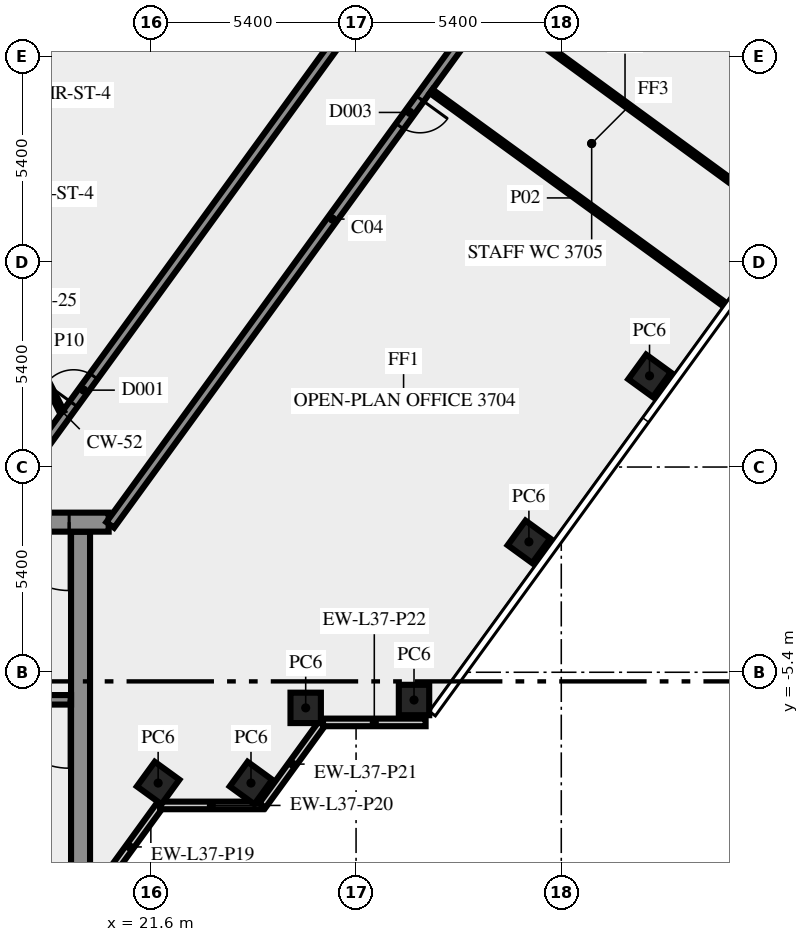
"""IFC4 building model, lengths in metres.
Left out: names, types, materials, properties, quantities, classifications, styles, units other than length and angle.
Written with IfcOpenShell. Run it as: python <this file> out.ifc"""

import sys

from ifc_helpers import new_model, si_unit, direction, frame, frame_2d, origin, origin_2d, place, context, subcontext, project, spatial, rectangle, extrude, element, fill, save


model = new_model("IFC4")
c1 = context("Model", 3, precision=1e-05, world=origin(), true_north=direction((0.0, 1.0)))
c2 = subcontext(c1, "Body", "Model", "MODEL_VIEW")
j1 = project(units=[si_unit("LENGTHUNIT", "METRE"), si_unit("PLANEANGLEUNIT", "RADIAN")], contexts=[c1])
p1 = place(None, origin())
s1 = spatial("IfcSite", under=j1, at=p1, CompositionType="ELEMENT")
p2 = place(p1, origin())
s2 = spatial("IfcBuilding", under=s1, at=p2, CompositionType="ELEMENT")
p3 = place(p2, frame((0.0, 0.0, 160.0)))
s3 = spatial("IfcBuildingStorey", under=s2, at=p3, CompositionType="ELEMENT", Elevation=160.0)
for number, where, z_axis, x_axis in (
    (1, (21.792, -8.315, 0.0), (0.0, 0.0, 1.0), (0.588, 0.809, 0.0)),
    (2, (24.235, -8.315, 0.0), (0.0, 0.0, 1.0), (0.588, 0.809, 0.0)),
    (3, (25.674, -6.337, 0.0), (0.0, 0.0, 1.0), (1.0, 0.0, 0.0)),
    (4, (28.525, -6.13, 0.0), (0.0, 0.0, 1.0), (1.0, 0.0, 0.0)),
    (5, (31.548, -1.969, 0.0), (0.0, 0.0, 1.0), (0.588, 0.809, 0.0)),
    (6, (34.722, 2.4, 0.0), (0.0, 0.0, 1.0), (0.588, 0.809, 0.0)),
):
    element("IfcColumn", number, at=place(p3, frame(where, z_axis=z_axis, x_axis=x_axis)), inside=s3, PredefinedType="COLUMN", context=c2, shape_type="SweptSolid", body=[
        extrude(rectangle(XDim=0.8, YDim=0.8, at=origin_2d()), origin(), (0.0, 0.0, 1.0), 3.65),
    ])
p4 = place(p3, frame((20.253, -11.083, 0.0), z_axis=(0.0, 0.0, 1.0), x_axis=(0.587766567315, 0.809030569476, 0.0)))
e7 = element("IfcWall", 7, at=p4, inside=s3, PredefinedType="SOLIDWALL", context=c2, shape_type="SweptSolid", body=[
    extrude(rectangle(XDim=2.688, YDim=0.2, at=frame_2d((1.344, 0.0))), origin(), (0.0, 0.0, 1.0), 3.65),
])
p5 = place(p3, frame((21.843, -8.904, 0.0), z_axis=(0.0, 0.0, 1.0), x_axis=(1.0, 0.0, 0.0)))
e8 = element("IfcWall", 8, at=p5, inside=s3, PredefinedType="SOLIDWALL", context=c2, shape_type="SweptSolid", body=[
    extrude(rectangle(XDim=2.7, YDim=0.2, at=frame_2d((1.35, 0.0))), origin(), (0.0, 0.0, 1.0), 3.65),
])
p6 = place(p3, frame((24.533, -8.909, 0.0), z_axis=(0.0, 0.0, 1.0), x_axis=(0.587720002413, 0.809064397168, 0.0)))
e9 = element("IfcWall", 9, at=p6, inside=s3, PredefinedType="SOLIDWALL", context=c2, shape_type="SweptSolid", body=[
    extrude(rectangle(XDim=2.7, YDim=0.2, at=frame_2d((1.35, 0.0))), origin(), (0.0, 0.0, 1.0), 3.65),
])
p7 = place(p3, frame((26.13, -6.719, 0.0), z_axis=(0.0, 0.0, 1.0), x_axis=(1.0, 0.0, 0.0)))
e10 = element("IfcWall", 10, at=p7, inside=s3, PredefinedType="SOLIDWALL", context=c2, shape_type="SweptSolid", body=[
    extrude(rectangle(XDim=2.7, YDim=0.2, at=frame_2d((1.35, 0.0))), origin(), (0.0, 0.0, 1.0), 3.65),
])
p8 = place(p3, frame((19.75, -10.5, 0.0), z_axis=(0.0, 0.0, 1.0), x_axis=(0.0, 1.0, 0.0)))
e11 = element("IfcWall", 11, at=p8, inside=s3, PredefinedType="SHEAR", context=c2, shape_type="SweptSolid", body=[
    extrude(rectangle(XDim=8.8, YDim=0.5, at=frame_2d((4.4, 0.0))), origin(), (0.0, 0.0, 1.0), 3.65),
])
p9 = place(p3, frame((19.5, -6.125, 0.0), z_axis=(0.0, 0.0, 1.0), x_axis=(-1.0, 0.0, 0.0)))
e12 = element("IfcWall", 12, at=p9, inside=s3, PredefinedType="SHEAR", context=c2, shape_type="SweptSolid", body=[
    extrude(rectangle(XDim=8.05, YDim=0.25, at=frame_2d((4.025, 0.0))), origin(), (0.0, 0.0, 1.0), 3.65),
])
p10 = place(p9, frame((0.05, 0.0, 0.0)))
e13 = element("IfcOpeningElement", 13, at=p10, cuts=e12, PredefinedType="OPENING", context=c2, shape_type="SweptSolid", body=[
    extrude(rectangle(XDim=1.8, YDim=2.1, at=frame_2d((0.9, 1.05))), frame((0.0, 0.135, 0.0), z_axis=(0.0, -1.0, 0.0), x_axis=(1.0, 0.0, 0.0)), (0.0, 0.0, 1.0), 0.27),
])
p11 = place(p3, frame((20.49, -1.45, 0.0), z_axis=(0.0, 0.0, 1.0), x_axis=(-1.0, 0.0, 0.0)))
e14 = element("IfcWall", 14, at=p11, inside=s3, PredefinedType="SHEAR", context=c2, shape_type="SweptSolid", body=[
    extrude(rectangle(XDim=40.98, YDim=0.5, at=frame_2d((20.49, 0.0))), origin(), (0.0, 0.0, 1.0), 3.65),
])
p12 = place(p11, frame((38.14, 0.0, 0.0)))
e15 = element("IfcOpeningElement", 15, at=p12, cuts=e14, PredefinedType="OPENING", context=c2, shape_type="SweptSolid", body=[
    extrude(rectangle(XDim=1.8, YDim=2.1, at=frame_2d((0.9, 1.05))), frame((0.0, 0.26, 0.0), z_axis=(0.0, -1.0, 0.0), x_axis=(1.0, 0.0, 0.0)), (0.0, 0.0, 1.0), 0.52),
])
p13 = place(p11, frame((35.89, 0.0, 0.0)))
e16 = element("IfcOpeningElement", 16, at=p13, cuts=e14, PredefinedType="OPENING", context=c2, shape_type="SweptSolid", body=[
    extrude(rectangle(XDim=0.9, YDim=2.1, at=frame_2d((0.45, 1.05))), frame((0.0, 0.26, 0.0), z_axis=(0.0, -1.0, 0.0), x_axis=(1.0, 0.0, 0.0)), (0.0, 0.0, 1.0), 0.52),
])
p14 = place(p11, frame((32.94, 0.0, 0.0)))
e17 = element("IfcOpeningElement", 17, at=p14, cuts=e14, PredefinedType="OPENING", context=c2, shape_type="SweptSolid", body=[
    extrude(rectangle(XDim=0.9, YDim=2.1, at=frame_2d((0.45, 1.05))), frame((0.0, 0.26, 0.0), z_axis=(0.0, -1.0, 0.0), x_axis=(1.0, 0.0, 0.0)), (0.0, 0.0, 1.0), 0.52),
])
p15 = place(p11, frame((28.802, 0.0, 0.0)))
e18 = element("IfcOpeningElement", 18, at=p15, cuts=e14, PredefinedType="OPENING", context=c2, shape_type="SweptSolid", body=[
    extrude(rectangle(XDim=0.9, YDim=2.1, at=frame_2d((0.45, 1.05))), frame((0.0, 0.26, 0.0), z_axis=(0.0, -1.0, 0.0), x_axis=(1.0, 0.0, 0.0)), (0.0, 0.0, 1.0), 0.52),
])
p16 = place(p11, frame((25.077, 0.0, 0.0)))
e19 = element("IfcOpeningElement", 19, at=p16, cuts=e14, PredefinedType="OPENING", context=c2, shape_type="SweptSolid", body=[
    extrude(rectangle(XDim=0.9, YDim=2.1, at=frame_2d((0.45, 1.05))), frame((0.0, 0.26, 0.0), z_axis=(0.0, -1.0, 0.0), x_axis=(1.0, 0.0, 0.0)), (0.0, 0.0, 1.0), 0.52),
])
p17 = place(p11, frame((21.765, 0.0, 0.0)))
e20 = element("IfcOpeningElement", 20, at=p17, cuts=e14, PredefinedType="OPENING", context=c2, shape_type="SweptSolid", body=[
    extrude(rectangle(XDim=2.0, YDim=2.1, at=frame_2d((1.0, 1.05))), frame((0.0, 0.26, 0.0), z_axis=(0.0, -1.0, 0.0), x_axis=(1.0, 0.0, 0.0)), (0.0, 0.0, 1.0), 0.52),
])
p18 = place(p11, frame((7.14, 0.0, 0.0)))
e21 = element("IfcOpeningElement", 21, at=p18, cuts=e14, PredefinedType="OPENING", context=c2, shape_type="SweptSolid", body=[
    extrude(rectangle(XDim=0.9, YDim=2.1, at=frame_2d((0.45, 1.05))), frame((0.0, 0.26, 0.0), z_axis=(0.0, -1.0, 0.0), x_axis=(1.0, 0.0, 0.0)), (0.0, 0.0, 1.0), 0.52),
])
p19 = place(p11, frame((5.028, 0.0, 0.0)))
e22 = element("IfcOpeningElement", 22, at=p19, cuts=e14, PredefinedType="OPENING", context=c2, shape_type="SweptSolid", body=[
    extrude(rectangle(XDim=0.8, YDim=2.1, at=frame_2d((0.4, 1.05))), frame((0.0, 0.26, 0.0), z_axis=(0.0, -1.0, 0.0), x_axis=(1.0, 0.0, 0.0)), (0.0, 0.0, 1.0), 0.52),
])
p20 = place(p11, frame((3.452, 0.0, 0.0)))
e23 = element("IfcOpeningElement", 23, at=p20, cuts=e14, PredefinedType="OPENING", context=c2, shape_type="SweptSolid", body=[
    extrude(rectangle(XDim=0.8, YDim=2.1, at=frame_2d((0.4, 1.05))), frame((0.0, 0.26, 0.0), z_axis=(0.0, -1.0, 0.0), x_axis=(1.0, 0.0, 0.0)), (0.0, 0.0, 1.0), 0.52),
])
p21 = place(p11, frame((1.04, 0.0, 0.0)))
e24 = element("IfcOpeningElement", 24, at=p21, cuts=e14, PredefinedType="OPENING", context=c2, shape_type="SweptSolid", body=[
    extrude(rectangle(XDim=1.8, YDim=2.1, at=frame_2d((0.9, 1.05))), frame((0.0, 0.26, 0.0), z_axis=(0.0, -1.0, 0.0), x_axis=(1.0, 0.0, 0.0)), (0.0, 0.0, 1.0), 0.52),
])
p22 = place(p3, frame((17.545, -1.125, 0.0), z_axis=(0.0, 0.0, 1.0), x_axis=(0.587786330937, 0.809016210693, 0.0)))
e25 = element("IfcWall", 25, at=p22, inside=s3, PredefinedType="SOLIDWALL", context=c2, shape_type="SweptSolid", body=[
    extrude(rectangle(XDim=30.103, YDim=0.25, at=frame_2d((15.052, 0.0))), origin(), (0.0, 0.0, 1.0), 3.65),
])
p23 = place(p22, frame((3.441, 0.0, 0.0)))
e26 = element("IfcOpeningElement", 26, at=p23, cuts=e25, PredefinedType="OPENING", context=c2, shape_type="SweptSolid", body=[
    extrude(rectangle(XDim=0.9, YDim=2.1, at=frame_2d((0.45, 1.05))), frame((0.0, 0.135, 0.0), z_axis=(0.0, -1.0, 0.0), x_axis=(1.0, 0.0, 0.0)), (0.0, 0.0, 1.0), 0.27),
])
p24 = place(p22, frame((28.729, 0.0, 0.0)))
e27 = element("IfcOpeningElement", 27, at=p24, cuts=e25, PredefinedType="OPENING", context=c2, shape_type="SweptSolid", body=[
    extrude(rectangle(XDim=0.9, YDim=2.1, at=frame_2d((0.45, 1.05))), frame((0.0, 0.135, 0.0), z_axis=(0.0, -1.0, 0.0), x_axis=(1.0, 0.0, 0.0)), (0.0, 0.0, 1.0), 0.27),
])
p25 = place(p3, frame((37.236, 21.469, 0.0), z_axis=(0.0, 0.0, 1.0), x_axis=(-0.58778344073, -0.809018310549, 0.0)))
e28 = element("IfcWall", 28, at=p25, inside=s3, PredefinedType="SOLIDWALL", context=c2, shape_type="SweptSolid", body=[
    extrude(rectangle(XDim=28.42, YDim=0.25, at=frame_2d((14.21, 0.0))), origin(), (0.0, 0.0, 1.0), 3.65),
])
p26 = place(p25, frame((14.554, 0.0, 0.0)))
e29 = element("IfcOpeningElement", 29, at=p26, cuts=e28, PredefinedType="OPENING", context=c2, shape_type="SweptSolid", body=[
    extrude(rectangle(XDim=0.9, YDim=2.1, at=frame_2d((0.45, 1.05))), frame((0.0, 0.135, 0.0), z_axis=(0.0, -1.0, 0.0), x_axis=(1.0, 0.0, 0.0)), (0.0, 0.0, 1.0), 0.27),
])
p27 = place(p25, frame((10.255, 0.0, 0.0)))
e30 = element("IfcOpeningElement", 30, at=p27, cuts=e28, PredefinedType="OPENING", context=c2, shape_type="SweptSolid", body=[
    extrude(rectangle(XDim=0.9, YDim=2.1, at=frame_2d((0.45, 1.05))), frame((0.0, 0.135, 0.0), z_axis=(0.0, -1.0, 0.0), x_axis=(1.0, 0.0, 0.0)), (0.0, 0.0, 1.0), 0.27),
])
p28 = place(p25, frame((11.854, 0.0, 0.0)))
e31 = element("IfcOpeningElement", 31, at=p28, cuts=e28, PredefinedType="OPENING", context=c2, shape_type="SweptSolid", body=[
    extrude(rectangle(XDim=0.9, YDim=2.1, at=frame_2d((0.45, 1.05))), frame((0.0, 0.135, 0.0), z_axis=(0.0, -1.0, 0.0), x_axis=(1.0, 0.0, 0.0)), (0.0, 0.0, 1.0), 0.27),
])
p29 = place(p3, frame((36.702, 4.274, 0.0), z_axis=(0.0, 0.0, 1.0), x_axis=(-0.808998008689, 0.58781138296, 0.0)))
e32 = element("IfcWall", 32, at=p29, inside=s3, PredefinedType="PARTITIONING", context=c2, shape_type="SweptSolid", body=[
    extrude(rectangle(XDim=9.55, YDim=0.12, at=frame_2d((4.775, 0.0))), origin(), (0.0, 0.0, 1.0), 2.85),
])
p30 = place(p3, frame((30.587, 12.104, 0.0), z_axis=(0.0, 0.0, 1.0), x_axis=(0.807584089733, -0.589752437902, 0.0)))
e33 = element("IfcWall", 33, at=p30, inside=s3, PredefinedType="PARTITIONING", context=c2, shape_type="SweptSolid", body=[
    extrude(rectangle(XDim=8.645, YDim=0.12, at=frame_2d((4.322, 0.0))), origin(), (0.0, 0.0, 1.0), 3.65),
])
p31 = place(p3, frame((18.0, 3.925, 0.0), z_axis=(0.0, 0.0, 1.0), x_axis=(0.453950796792, -0.891026752736, 0.0)))
e34 = element("IfcWall", 34, at=p31, inside=s3, PredefinedType="PARTITIONING", context=c2, shape_type="SweptSolid", body=[
    extrude(rectangle(XDim=2.778, YDim=0.12, at=frame_2d((1.389, 0.0))), origin(), (0.0, 0.0, 1.0), 3.65),
])
p32 = place(p10, origin())
e35 = element("IfcDoor", 35, at=p32, inside=s3, OperationType="DOUBLE_DOOR_SINGLE_SWING", PredefinedType="DOOR", context=c2, shape_type="SweptSolid", body=[
    extrude(rectangle(XDim=1.8, YDim=2.1, at=frame_2d((0.9, 1.05))), frame((0.0, 0.025, 0.0), z_axis=(0.0, -1.0, 0.0), x_axis=(1.0, 0.0, 0.0)), (0.0, 0.0, 1.0), 0.05),
])
fill(e13, e35)
p33 = place(p21, origin())
e36 = element("IfcDoor", 36, at=p33, inside=s3, OperationType="DOUBLE_DOOR_SINGLE_SWING", PredefinedType="DOOR", context=c2, shape_type="SweptSolid", body=[
    extrude(rectangle(XDim=1.8, YDim=2.1, at=frame_2d((0.9, 1.05))), frame((0.0, 0.025, 0.0), z_axis=(0.0, -1.0, 0.0), x_axis=(1.0, 0.0, 0.0)), (0.0, 0.0, 1.0), 0.05),
])
fill(e24, e36)
p34 = place(p23, origin())
e37 = element("IfcDoor", 37, at=p34, inside=s3, OperationType="SINGLE_SWING_LEFT", PredefinedType="DOOR", context=c2, shape_type="SweptSolid", body=[
    extrude(rectangle(XDim=0.9, YDim=2.1, at=frame_2d((0.45, 1.05))), frame((0.0, 0.025, 0.0), z_axis=(0.0, -1.0, 0.0), x_axis=(1.0, 0.0, 0.0)), (0.0, 0.0, 1.0), 0.05),
])
fill(e26, e37)
p35 = place(p26, origin())
e38 = element("IfcDoor", 38, at=p35, inside=s3, OperationType="SINGLE_SWING_LEFT", PredefinedType="DOOR", context=c2, shape_type="SweptSolid", body=[
    extrude(rectangle(XDim=0.9, YDim=2.1, at=frame_2d((0.45, 1.05))), frame((0.0, 0.025, 0.0), z_axis=(0.0, -1.0, 0.0), x_axis=(1.0, 0.0, 0.0)), (0.0, 0.0, 1.0), 0.05),
])
fill(e29, e38)
save(model, sys.argv[1])
